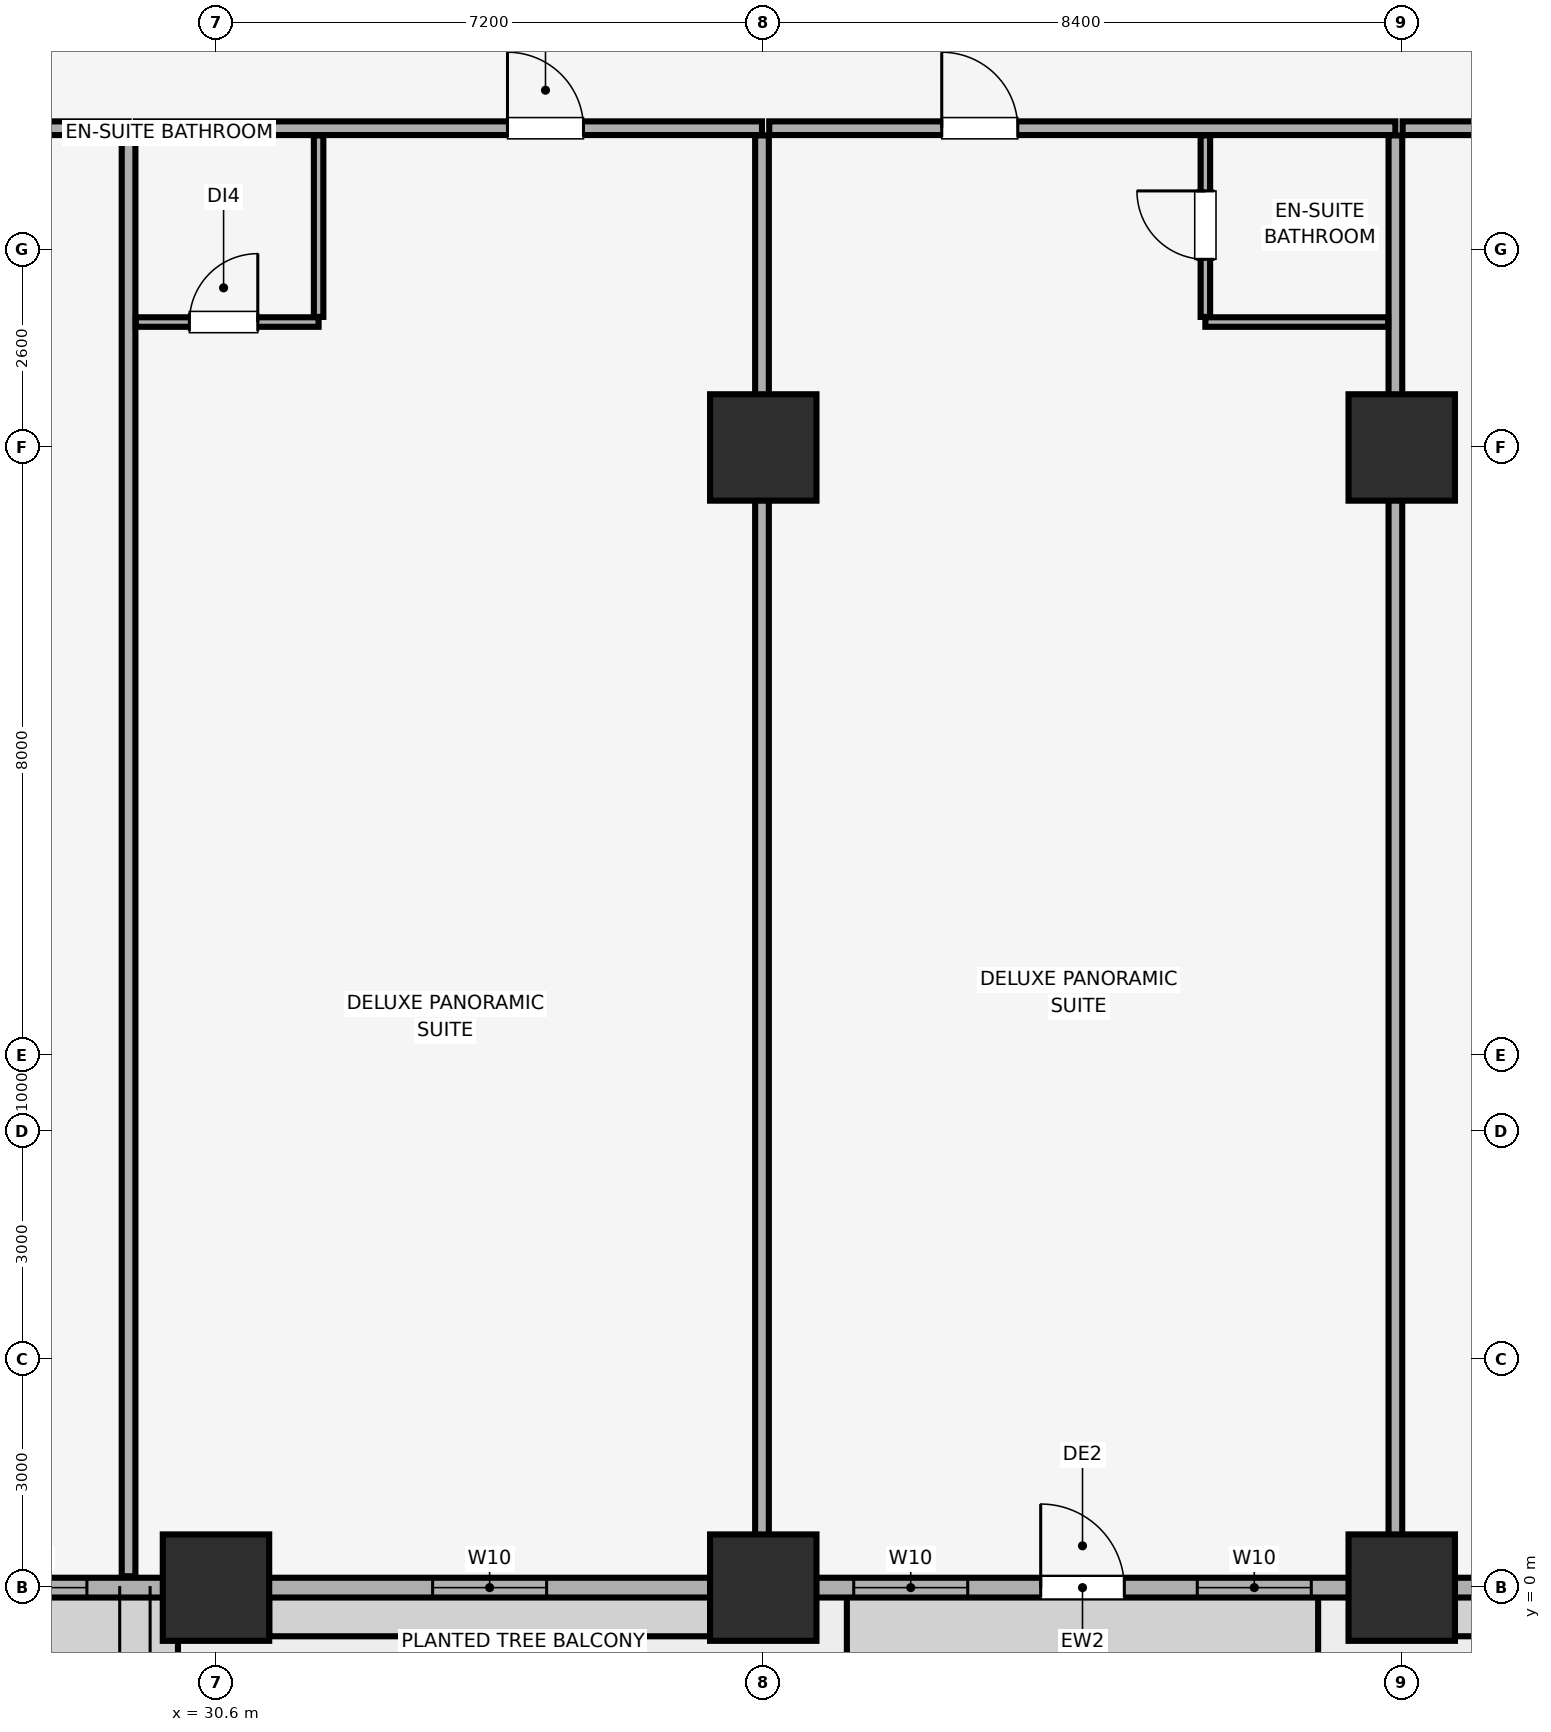
"""IFC4 building model, lengths in metres.
Left out: names, types, materials, properties, quantities, classifications, styles, units other than length and angle.
Written with IfcOpenShell. Run it as: python <this file> out.ifc"""

import sys

from ifc_helpers import new_model, si_unit, direction, frame, frame_2d, origin, origin_2d, place, context, subcontext, project, spatial, rectangle, extrude, element, fill, save


model = new_model("IFC4")
c1 = context("Model", 3, precision=1e-05, world=origin(), true_north=direction((0.0, 1.0)))
c2 = subcontext(c1, "Body", "Model", "MODEL_VIEW")
j1 = project(units=[si_unit("LENGTHUNIT", "METRE"), si_unit("PLANEANGLEUNIT", "RADIAN")], contexts=[c1])
p1 = place(None, origin())
s1 = spatial("IfcSite", under=j1, at=p1, CompositionType="ELEMENT")
p2 = place(p1, origin())
s2 = spatial("IfcBuilding", under=s1, at=p2, CompositionType="ELEMENT")
p3 = place(p2, frame((0.0, 0.0, 76.4)))
s3 = spatial("IfcBuildingStorey", under=s2, at=p3, CompositionType="ELEMENT", Elevation=76.4)
for number, where, z_axis, x_axis in (
    (1, (30.6, 0.0, 0.0), (0.0, 0.0, 1.0), (1.0, 0.0, 0.0)),
    (2, (37.8, 0.0, 0.0), (0.0, 0.0, 1.0), (1.0, 0.0, 0.0)),
    (3, (46.2, 0.0, 0.0), (0.0, 0.0, 1.0), (1.0, 0.0, 0.0)),
    (4, (37.8, 15.0, 0.0), (0.0, 0.0, 1.0), (1.0, 0.0, 0.0)),
    (5, (46.2, 15.0, 0.0), (0.0, 0.0, 1.0), (1.0, 0.0, 0.0)),
):
    element("IfcColumn", number, at=place(p3, frame(where, z_axis=z_axis, x_axis=x_axis)), inside=s3, PredefinedType="COLUMN", context=c2, shape_type="SweptSolid", body=[
        extrude(rectangle(XDim=1.4, YDim=1.4, at=origin_2d()), origin(), (0.0, 0.0, 1.0), 3.4),
    ])
p4 = place(p3, frame((4.2, 0.0, 0.0), z_axis=(0.0, 0.0, 1.0), x_axis=(1.0, 0.0, 0.0)))
e6 = element("IfcWall", 6, at=p4, inside=s3, PredefinedType="SOLIDWALL", context=c2, shape_type="SweptSolid", body=[
    extrude(rectangle(XDim=75.6, YDim=0.26, at=frame_2d((37.8, 0.0))), origin(), (0.0, 0.0, 1.0), 2.45),
])
p5 = place(p4, frame((21.383, 0.0, 0.0)))
e7 = element("IfcOpeningElement", 7, at=p5, cuts=e6, PredefinedType="OPENING", context=c2, shape_type="SweptSolid", body=[
    extrude(rectangle(XDim=1.1, YDim=2.15, at=frame_2d((0.55, 1.075))), frame((0.0, 0.14, 0.0), z_axis=(0.0, -1.0, 0.0), x_axis=(1.0, 0.0, 0.0)), (0.0, 0.0, 1.0), 0.28),
])
p6 = place(p4, frame((37.25, 0.0, 0.0)))
e8 = element("IfcOpeningElement", 8, at=p6, cuts=e6, PredefinedType="OPENING", context=c2, shape_type="SweptSolid", body=[
    extrude(rectangle(XDim=1.1, YDim=2.15, at=frame_2d((0.55, 1.075))), frame((0.0, 0.14, 0.0), z_axis=(0.0, -1.0, 0.0), x_axis=(1.0, 0.0, 0.0)), (0.0, 0.0, 1.0), 0.28),
])
p7 = place(p4, frame((53.117, 0.0, 0.0)))
e9 = element("IfcOpeningElement", 9, at=p7, cuts=e6, PredefinedType="OPENING", context=c2, shape_type="SweptSolid", body=[
    extrude(rectangle(XDim=1.1, YDim=2.15, at=frame_2d((0.55, 1.075))), frame((0.0, 0.14, 0.0), z_axis=(0.0, -1.0, 0.0), x_axis=(1.0, 0.0, 0.0)), (0.0, 0.0, 1.0), 0.28),
])
p8 = place(p4, frame((1.485, 0.0, 0.85)))
e10 = element("IfcOpeningElement", 10, at=p8, cuts=e6, PredefinedType="OPENING", context=c2, shape_type="SweptSolid", body=[
    extrude(rectangle(XDim=1.5, YDim=1.4, at=frame_2d((0.75, 0.7))), frame((0.0, 0.14, 0.0), z_axis=(0.0, -1.0, 0.0), x_axis=(1.0, 0.0, 0.0)), (0.0, 0.0, 1.0), 0.28),
])
p9 = place(p4, frame((6.142, 0.0, 0.85)))
e11 = element("IfcOpeningElement", 11, at=p9, cuts=e6, PredefinedType="OPENING", context=c2, shape_type="SweptSolid", body=[
    extrude(rectangle(XDim=1.5, YDim=1.4, at=frame_2d((0.75, 0.7))), frame((0.0, 0.14, 0.0), z_axis=(0.0, -1.0, 0.0), x_axis=(1.0, 0.0, 0.0)), (0.0, 0.0, 1.0), 0.28),
])
p10 = place(p4, frame((9.342, 0.0, 0.85)))
e12 = element("IfcOpeningElement", 12, at=p10, cuts=e6, PredefinedType="OPENING", context=c2, shape_type="SweptSolid", body=[
    extrude(rectangle(XDim=1.5, YDim=1.4, at=frame_2d((0.75, 0.7))), frame((0.0, 0.14, 0.0), z_axis=(0.0, -1.0, 0.0), x_axis=(1.0, 0.0, 0.0)), (0.0, 0.0, 1.0), 0.28),
])
p11 = place(p4, frame((13.908, 0.0, 0.85)))
e13 = element("IfcOpeningElement", 13, at=p11, cuts=e6, PredefinedType="OPENING", context=c2, shape_type="SweptSolid", body=[
    extrude(rectangle(XDim=1.5, YDim=1.4, at=frame_2d((0.75, 0.7))), frame((0.0, 0.14, 0.0), z_axis=(0.0, -1.0, 0.0), x_axis=(1.0, 0.0, 0.0)), (0.0, 0.0, 1.0), 0.28),
])
p12 = place(p4, frame((23.202, 0.0, 0.85)))
e14 = element("IfcOpeningElement", 14, at=p12, cuts=e6, PredefinedType="OPENING", context=c2, shape_type="SweptSolid", body=[
    extrude(rectangle(XDim=1.5, YDim=1.4, at=frame_2d((0.75, 0.7))), frame((0.0, 0.14, 0.0), z_axis=(0.0, -1.0, 0.0), x_axis=(1.0, 0.0, 0.0)), (0.0, 0.0, 1.0), 0.28),
])
p13 = place(p4, frame((29.25, 0.0, 0.85)))
e15 = element("IfcOpeningElement", 15, at=p13, cuts=e6, PredefinedType="OPENING", context=c2, shape_type="SweptSolid", body=[
    extrude(rectangle(XDim=1.5, YDim=1.4, at=frame_2d((0.75, 0.7))), frame((0.0, 0.14, 0.0), z_axis=(0.0, -1.0, 0.0), x_axis=(1.0, 0.0, 0.0)), (0.0, 0.0, 1.0), 0.28),
])
p14 = place(p4, frame((34.79, 0.0, 0.85)))
e16 = element("IfcOpeningElement", 16, at=p14, cuts=e6, PredefinedType="OPENING", context=c2, shape_type="SweptSolid", body=[
    extrude(rectangle(XDim=1.5, YDim=1.4, at=frame_2d((0.75, 0.7))), frame((0.0, 0.14, 0.0), z_axis=(0.0, -1.0, 0.0), x_axis=(1.0, 0.0, 0.0)), (0.0, 0.0, 1.0), 0.28),
])
p15 = place(p4, frame((39.31, 0.0, 0.85)))
e17 = element("IfcOpeningElement", 17, at=p15, cuts=e6, PredefinedType="OPENING", context=c2, shape_type="SweptSolid", body=[
    extrude(rectangle(XDim=1.5, YDim=1.4, at=frame_2d((0.75, 0.7))), frame((0.0, 0.14, 0.0), z_axis=(0.0, -1.0, 0.0), x_axis=(1.0, 0.0, 0.0)), (0.0, 0.0, 1.0), 0.28),
])
p16 = place(p4, frame((44.85, 0.0, 0.85)))
e18 = element("IfcOpeningElement", 18, at=p16, cuts=e6, PredefinedType="OPENING", context=c2, shape_type="SweptSolid", body=[
    extrude(rectangle(XDim=1.5, YDim=1.4, at=frame_2d((0.75, 0.7))), frame((0.0, 0.14, 0.0), z_axis=(0.0, -1.0, 0.0), x_axis=(1.0, 0.0, 0.0)), (0.0, 0.0, 1.0), 0.28),
])
p17 = place(p4, frame((50.848, 0.0, 0.85)))
e19 = element("IfcOpeningElement", 19, at=p17, cuts=e6, PredefinedType="OPENING", context=c2, shape_type="SweptSolid", body=[
    extrude(rectangle(XDim=1.5, YDim=1.4, at=frame_2d((0.75, 0.7))), frame((0.0, 0.14, 0.0), z_axis=(0.0, -1.0, 0.0), x_axis=(1.0, 0.0, 0.0)), (0.0, 0.0, 1.0), 0.28),
])
p18 = place(p4, frame((60.142, 0.0, 0.85)))
e20 = element("IfcOpeningElement", 20, at=p18, cuts=e6, PredefinedType="OPENING", context=c2, shape_type="SweptSolid", body=[
    extrude(rectangle(XDim=1.5, YDim=1.4, at=frame_2d((0.75, 0.7))), frame((0.0, 0.14, 0.0), z_axis=(0.0, -1.0, 0.0), x_axis=(1.0, 0.0, 0.0)), (0.0, 0.0, 1.0), 0.28),
])
p19 = place(p4, frame((64.708, 0.0, 0.85)))
e21 = element("IfcOpeningElement", 21, at=p19, cuts=e6, PredefinedType="OPENING", context=c2, shape_type="SweptSolid", body=[
    extrude(rectangle(XDim=1.5, YDim=1.4, at=frame_2d((0.75, 0.7))), frame((0.0, 0.14, 0.0), z_axis=(0.0, -1.0, 0.0), x_axis=(1.0, 0.0, 0.0)), (0.0, 0.0, 1.0), 0.28),
])
p20 = place(p4, frame((67.908, 0.0, 0.85)))
e22 = element("IfcOpeningElement", 22, at=p20, cuts=e6, PredefinedType="OPENING", context=c2, shape_type="SweptSolid", body=[
    extrude(rectangle(XDim=1.5, YDim=1.4, at=frame_2d((0.75, 0.7))), frame((0.0, 0.14, 0.0), z_axis=(0.0, -1.0, 0.0), x_axis=(1.0, 0.0, 0.0)), (0.0, 0.0, 1.0), 0.28),
])
p21 = place(p4, frame((72.615, 0.0, 0.85)))
e23 = element("IfcOpeningElement", 23, at=p21, cuts=e6, PredefinedType="OPENING", context=c2, shape_type="SweptSolid", body=[
    extrude(rectangle(XDim=1.5, YDim=1.4, at=frame_2d((0.75, 0.7))), frame((0.0, 0.14, 0.0), z_axis=(0.0, -1.0, 0.0), x_axis=(1.0, 0.0, 0.0)), (0.0, 0.0, 1.0), 0.28),
])
p22 = place(p3, frame((21.212, 19.2, 0.0), z_axis=(0.0, 0.0, 1.0), x_axis=(1.0, 0.0, 0.0)))
e24 = element("IfcWall", 24, at=p22, inside=s3, PredefinedType="PARTITIONING", context=c2, shape_type="SweptSolid", body=[
    extrude(rectangle(XDim=8.238, YDim=0.18, at=frame_2d((4.119, 0.0))), origin(), (0.0, 0.0, 1.0), 3.4),
])
p23 = place(p22, frame((5.271, 0.0, 0.0)))
e25 = element("IfcOpeningElement", 25, at=p23, cuts=e24, PredefinedType="OPENING", context=c2, shape_type="SweptSolid", body=[
    extrude(rectangle(XDim=1.0, YDim=2.15, at=frame_2d((0.5, 1.075))), frame((0.0, 0.1, 0.0), z_axis=(0.0, -1.0, 0.0), x_axis=(1.0, 0.0, 0.0)), (0.0, 0.0, 1.0), 0.2),
])
p24 = place(p3, frame((29.45, 0.15, 0.0), z_axis=(0.0, 0.0, 1.0), x_axis=(0.0, 1.0, 0.0)))
e26 = element("IfcWall", 26, at=p24, inside=s3, PredefinedType="PARTITIONING", context=c2, shape_type="SweptSolid", body=[
    extrude(rectangle(XDim=18.955, YDim=0.18, at=frame_2d((9.478, 0.0))), origin(), (0.0, 0.0, 1.0), 3.4),
])
p25 = place(p3, frame((29.545, 19.2, 0.0), z_axis=(0.0, 0.0, 1.0), x_axis=(1.0, 0.0, 0.0)))
e27 = element("IfcWall", 27, at=p25, inside=s3, PredefinedType="PARTITIONING", context=c2, shape_type="SweptSolid", body=[
    extrude(rectangle(XDim=8.238, YDim=0.18, at=frame_2d((4.119, 0.0))), origin(), (0.0, 0.0, 1.0), 3.4),
])
p26 = place(p25, frame((4.89, 0.0, 0.0)))
e28 = element("IfcOpeningElement", 28, at=p26, cuts=e27, PredefinedType="OPENING", context=c2, shape_type="SweptSolid", body=[
    extrude(rectangle(XDim=1.0, YDim=2.15, at=frame_2d((0.5, 1.075))), frame((0.0, 0.1, 0.0), z_axis=(0.0, -1.0, 0.0), x_axis=(1.0, 0.0, 0.0)), (0.0, 0.0, 1.0), 0.2),
])
p27 = place(p3, frame((37.783, 0.15, 0.0), z_axis=(0.0, 0.0, 1.0), x_axis=(0.0, 1.0, 0.0)))
e29 = element("IfcWall", 29, at=p27, inside=s3, PredefinedType="PARTITIONING", context=c2, shape_type="SweptSolid", body=[
    extrude(rectangle(XDim=18.955, YDim=0.18, at=frame_2d((9.478, 0.0))), origin(), (0.0, 0.0, 1.0), 2.8),
])
p28 = place(p3, frame((29.545, 16.65, 0.0), z_axis=(0.0, 0.0, 1.0), x_axis=(1.0, 0.0, 0.0)))
e30 = element("IfcWall", 30, at=p28, inside=s3, PredefinedType="PARTITIONING", context=c2, shape_type="SweptSolid", body=[
    extrude(rectangle(XDim=2.405, YDim=0.125, at=frame_2d((1.203, 0.0))), origin(), (0.0, 0.0, 1.0), 3.4),
])
p29 = place(p28, frame((0.705, 0.0, 0.0)))
e31 = element("IfcOpeningElement", 31, at=p29, cuts=e30, PredefinedType="OPENING", context=c2, shape_type="SweptSolid", body=[
    extrude(rectangle(XDim=0.9, YDim=2.1, at=frame_2d((0.45, 1.05))), frame((0.0, 0.073, 0.0), z_axis=(0.0, -1.0, 0.0), x_axis=(1.0, 0.0, 0.0)), (0.0, 0.0, 1.0), 0.145),
])
p30 = place(p3, frame((31.95, 16.718, 0.0), z_axis=(0.0, 0.0, 1.0), x_axis=(0.0, 1.0, 0.0)))
e32 = element("IfcWall", 32, at=p30, inside=s3, PredefinedType="PARTITIONING", context=c2, shape_type="SweptSolid", body=[
    extrude(rectangle(XDim=2.387, YDim=0.125, at=frame_2d((1.194, 0.0))), origin(), (0.0, 0.0, 1.0), 3.4),
])
p31 = place(p3, frame((37.878, 19.2, 0.0), z_axis=(0.0, 0.0, 1.0), x_axis=(1.0, 0.0, 0.0)))
e33 = element("IfcWall", 33, at=p31, inside=s3, PredefinedType="PARTITIONING", context=c2, shape_type="SweptSolid", body=[
    extrude(rectangle(XDim=8.238, YDim=0.18, at=frame_2d((4.119, 0.0))), origin(), (0.0, 0.0, 1.0), 3.4),
])
p32 = place(p31, frame((2.27, 0.0, 0.0)))
e34 = element("IfcOpeningElement", 34, at=p32, cuts=e33, PredefinedType="OPENING", context=c2, shape_type="SweptSolid", body=[
    extrude(rectangle(XDim=1.0, YDim=2.15, at=frame_2d((0.5, 1.075))), frame((0.0, 0.1, 0.0), z_axis=(0.0, -1.0, 0.0), x_axis=(1.0, 0.0, 0.0)), (0.0, 0.0, 1.0), 0.2),
])
p33 = place(p3, frame((46.116, 0.15, 0.0), z_axis=(0.0, 0.0, 1.0), x_axis=(0.0, 1.0, 0.0)))
e35 = element("IfcWall", 35, at=p33, inside=s3, PredefinedType="PARTITIONING", context=c2, shape_type="SweptSolid", body=[
    extrude(rectangle(XDim=18.955, YDim=0.18, at=frame_2d((9.478, 0.0))), origin(), (0.0, 0.0, 1.0), 2.8),
])
p34 = place(p3, frame((43.616, 16.65, 0.0), z_axis=(0.0, 0.0, 1.0), x_axis=(1.0, 0.0, 0.0)))
e36 = element("IfcWall", 36, at=p34, inside=s3, PredefinedType="PARTITIONING", context=c2, shape_type="SweptSolid", body=[
    extrude(rectangle(XDim=2.405, YDim=0.125, at=frame_2d((1.203, 0.0))), origin(), (0.0, 0.0, 1.0), 3.4),
])
p35 = place(p3, frame((43.616, 16.718, 0.0), z_axis=(0.0, 0.0, 1.0), x_axis=(0.0, 1.0, 0.0)))
e37 = element("IfcWall", 37, at=p35, inside=s3, PredefinedType="PARTITIONING", context=c2, shape_type="SweptSolid", body=[
    extrude(rectangle(XDim=2.387, YDim=0.125, at=frame_2d((1.194, 0.0))), origin(), (0.0, 0.0, 1.0), 3.4),
])
p36 = place(p35, frame((0.758, 0.0, 0.0)))
e38 = element("IfcOpeningElement", 38, at=p36, cuts=e37, PredefinedType="OPENING", context=c2, shape_type="SweptSolid", body=[
    extrude(rectangle(XDim=0.9, YDim=2.1, at=frame_2d((0.45, 1.05))), frame((0.0, 0.073, 0.0), z_axis=(0.0, -1.0, 0.0), x_axis=(1.0, 0.0, 0.0)), (0.0, 0.0, 1.0), 0.145),
])
p37 = place(p3, frame((46.211, 19.2, 0.0), z_axis=(0.0, 0.0, 1.0), x_axis=(1.0, 0.0, 0.0)))
e39 = element("IfcWall", 39, at=p37, inside=s3, PredefinedType="PARTITIONING", context=c2, shape_type="SweptSolid", body=[
    extrude(rectangle(XDim=8.238, YDim=0.18, at=frame_2d((4.119, 0.0))), origin(), (0.0, 0.0, 1.0), 3.4),
])
p38 = place(p37, frame((2.303, 0.0, 0.0)))
e40 = element("IfcOpeningElement", 40, at=p38, cuts=e39, PredefinedType="OPENING", context=c2, shape_type="SweptSolid", body=[
    extrude(rectangle(XDim=1.0, YDim=2.15, at=frame_2d((0.5, 1.075))), frame((0.0, 0.1, 0.0), z_axis=(0.0, -1.0, 0.0), x_axis=(1.0, 0.0, 0.0)), (0.0, 0.0, 1.0), 0.2),
])
p39 = place(p6, origin())
e41 = element("IfcDoor", 41, at=p39, inside=s3, OperationType="SINGLE_SWING_LEFT", PredefinedType="DOOR", context=c2, shape_type="SweptSolid", body=[
    extrude(rectangle(XDim=1.1, YDim=2.15, at=frame_2d((0.55, 1.075))), frame((0.0, 0.025, 0.0), z_axis=(0.0, -1.0, 0.0), x_axis=(1.0, 0.0, 0.0)), (0.0, 0.0, 1.0), 0.05),
])
fill(e8, e41)
p40 = place(p12, origin())
e42 = element("IfcWindow", 42, at=p40, inside=s3, PartitioningType="SINGLE_PANEL", PredefinedType="WINDOW", context=c2, shape_type="SweptSolid", body=[
    extrude(rectangle(XDim=1.5, YDim=1.4, at=frame_2d((0.75, 0.7))), frame((0.0, 0.03, 0.0), z_axis=(0.0, -1.0, 0.0), x_axis=(1.0, 0.0, 0.0)), (0.0, 0.0, 1.0), 0.06),
])
fill(e14, e42)
p41 = place(p13, origin())
e43 = element("IfcWindow", 43, at=p41, inside=s3, PartitioningType="SINGLE_PANEL", PredefinedType="WINDOW", context=c2, shape_type="SweptSolid", body=[
    extrude(rectangle(XDim=1.5, YDim=1.4, at=frame_2d((0.75, 0.7))), frame((0.0, 0.03, 0.0), z_axis=(0.0, -1.0, 0.0), x_axis=(1.0, 0.0, 0.0)), (0.0, 0.0, 1.0), 0.06),
])
fill(e15, e43)
p42 = place(p14, origin())
e44 = element("IfcWindow", 44, at=p42, inside=s3, PartitioningType="SINGLE_PANEL", PredefinedType="WINDOW", context=c2, shape_type="SweptSolid", body=[
    extrude(rectangle(XDim=1.5, YDim=1.4, at=frame_2d((0.75, 0.7))), frame((0.0, 0.03, 0.0), z_axis=(0.0, -1.0, 0.0), x_axis=(1.0, 0.0, 0.0)), (0.0, 0.0, 1.0), 0.06),
])
fill(e16, e44)
p43 = place(p15, origin())
e45 = element("IfcWindow", 45, at=p43, inside=s3, PartitioningType="SINGLE_PANEL", PredefinedType="WINDOW", context=c2, shape_type="SweptSolid", body=[
    extrude(rectangle(XDim=1.5, YDim=1.4, at=frame_2d((0.75, 0.7))), frame((0.0, 0.03, 0.0), z_axis=(0.0, -1.0, 0.0), x_axis=(1.0, 0.0, 0.0)), (0.0, 0.0, 1.0), 0.06),
])
fill(e17, e45)
p44 = place(p26, origin())
e46 = element("IfcDoor", 46, at=p44, inside=s3, OperationType="SINGLE_SWING_LEFT", PredefinedType="DOOR", context=c2, shape_type="SweptSolid", body=[
    extrude(rectangle(XDim=1.0, YDim=2.15, at=frame_2d((0.5, 1.075))), frame((0.0, 0.025, 0.0), z_axis=(0.0, -1.0, 0.0), x_axis=(1.0, 0.0, 0.0)), (0.0, 0.0, 1.0), 0.05),
])
fill(e28, e46)
p45 = place(p29, origin())
e47 = element("IfcDoor", 47, at=p45, inside=s3, OperationType="SINGLE_SWING_RIGHT", PredefinedType="DOOR", context=c2, shape_type="SweptSolid", body=[
    extrude(rectangle(XDim=0.9, YDim=2.1, at=frame_2d((0.45, 1.05))), frame((0.0, 0.025, 0.0), z_axis=(0.0, -1.0, 0.0), x_axis=(1.0, 0.0, 0.0)), (0.0, 0.0, 1.0), 0.05),
])
fill(e31, e47)
p46 = place(p32, origin())
e48 = element("IfcDoor", 48, at=p46, inside=s3, OperationType="SINGLE_SWING_LEFT", PredefinedType="DOOR", context=c2, shape_type="SweptSolid", body=[
    extrude(rectangle(XDim=1.0, YDim=2.15, at=frame_2d((0.5, 1.075))), frame((0.0, 0.025, 0.0), z_axis=(0.0, -1.0, 0.0), x_axis=(1.0, 0.0, 0.0)), (0.0, 0.0, 1.0), 0.05),
])
fill(e34, e48)
p47 = place(p36, origin())
e49 = element("IfcDoor", 49, at=p47, inside=s3, OperationType="SINGLE_SWING_RIGHT", PredefinedType="DOOR", context=c2, shape_type="SweptSolid", body=[
    extrude(rectangle(XDim=0.9, YDim=2.1, at=frame_2d((0.45, 1.05))), frame((0.0, 0.025, 0.0), z_axis=(0.0, -1.0, 0.0), x_axis=(1.0, 0.0, 0.0)), (0.0, 0.0, 1.0), 0.05),
])
fill(e38, e49)
save(model, sys.argv[1])
